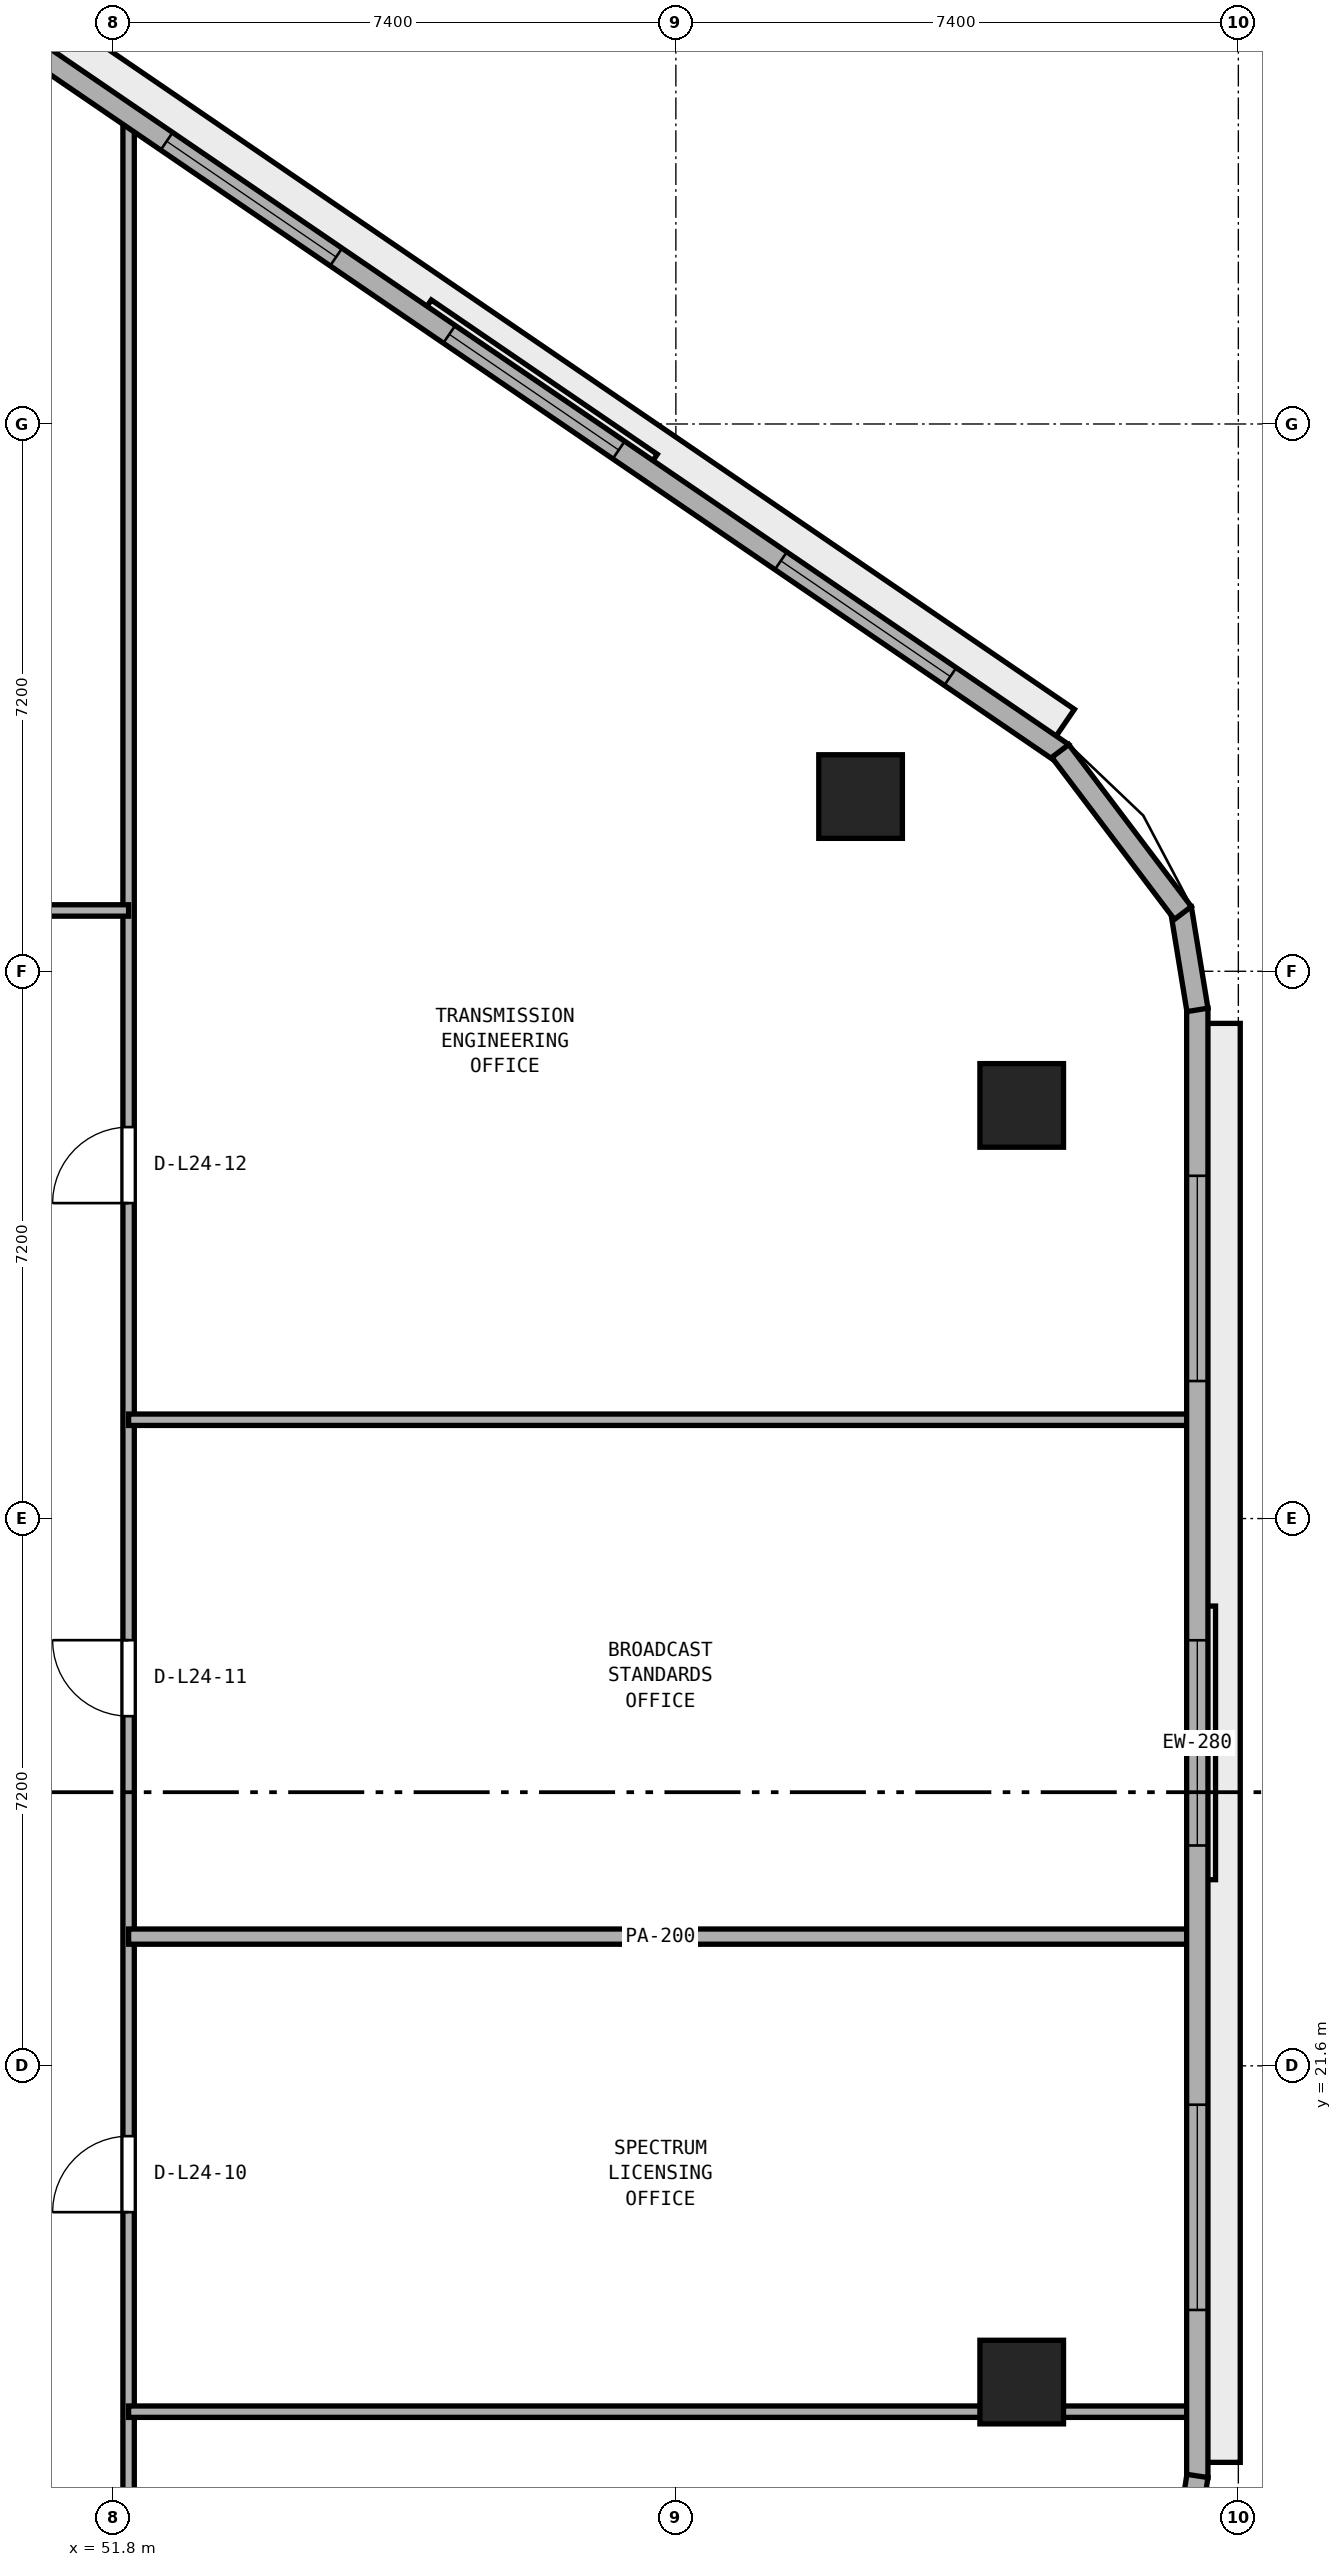
"""IFC4 building model, lengths in metres.
Left out: names, types, materials, properties, quantities, classifications, styles, units other than length and angle.
Written with IfcOpenShell. Run it as: python <this file> out.ifc"""

import sys

from ifc_helpers import new_model, si_unit, direction, frame, frame_2d, origin, origin_2d, place, context, subcontext, project, spatial, rectangle, extrude, element, fill, save


model = new_model("IFC4")
c1 = context("Model", 3, precision=1e-05, world=origin(), true_north=direction((0.0, 1.0)))
c2 = subcontext(c1, "Body", "Model", "MODEL_VIEW")
j1 = project(units=[si_unit("LENGTHUNIT", "METRE"), si_unit("PLANEANGLEUNIT", "RADIAN")], contexts=[c1])
p1 = place(None, origin())
s1 = spatial("IfcSite", under=j1, at=p1, CompositionType="ELEMENT")
p2 = place(p1, origin())
s2 = spatial("IfcBuilding", under=s1, at=p2, CompositionType="ELEMENT")
p3 = place(p2, frame((0.0, 0.0, 97.2)))
s3 = spatial("IfcBuildingStorey", under=s2, at=p3, CompositionType="ELEMENT", Elevation=97.2)
for number, where, z_axis, x_axis in (
    (1, (63.75, 17.44, 0.0), (0.0, 0.0, 1.0), (1.0, 0.0, 0.0)),
    (2, (63.75, 34.235, 0.0), (0.0, 0.0, 1.0), (1.0, 0.0, 0.0)),
    (3, (61.63, 38.299, 0.0), (0.0, 0.0, 1.0), (1.0, 0.0, 0.0)),
):
    element("IfcColumn", number, at=place(p3, frame(where, z_axis=z_axis, x_axis=x_axis)), inside=s3, PredefinedType="COLUMN", context=c2, shape_type="SweptSolid", body=[
        extrude(rectangle(XDim=1.1, YDim=1.1, at=origin_2d()), origin(), (0.0, 0.0, 1.0), 3.8),
    ])
p4 = place(p3, frame((52.0, 13.6, 0.0), z_axis=(0.0, 0.0, 1.0), x_axis=(0.0, 1.0, 0.0)))
e4 = element("IfcWall", 4, at=p4, inside=s3, PredefinedType="PARTITIONING", context=c2, shape_type="SweptSolid", body=[
    extrude(rectangle(XDim=33.691, YDim=0.15, at=frame_2d((16.846, 0.0))), origin(), (0.0, 0.0, 1.0), 3.525),
])
p5 = place(p4, frame((6.075, 0.0, 0.0)))
e5 = element("IfcOpeningElement", 5, at=p5, cuts=e4, PredefinedType="OPENING", context=c2, shape_type="SweptSolid", body=[
    extrude(rectangle(XDim=1.0, YDim=2.12, at=frame_2d((0.5, 1.06))), frame((0.0, 0.085, 0.0), z_axis=(0.0, -1.0, 0.0), x_axis=(1.0, 0.0, 0.0)), (0.0, 0.0, 1.0), 0.17),
])
p6 = place(p4, frame((12.6, 0.0, 0.0)))
e6 = element("IfcOpeningElement", 6, at=p6, cuts=e4, PredefinedType="OPENING", context=c2, shape_type="SweptSolid", body=[
    extrude(rectangle(XDim=1.0, YDim=2.12, at=frame_2d((0.5, 1.06))), frame((0.0, 0.085, 0.0), z_axis=(0.0, -1.0, 0.0), x_axis=(1.0, 0.0, 0.0)), (0.0, 0.0, 1.0), 0.17),
])
p7 = place(p4, frame((19.35, 0.0, 0.0)))
e7 = element("IfcOpeningElement", 7, at=p7, cuts=e4, PredefinedType="OPENING", context=c2, shape_type="SweptSolid", body=[
    extrude(rectangle(XDim=1.0, YDim=2.12, at=frame_2d((0.5, 1.06))), frame((0.0, 0.085, 0.0), z_axis=(0.0, -1.0, 0.0), x_axis=(1.0, 0.0, 0.0)), (0.0, 0.0, 1.0), 0.17),
])
p8 = place(p3, frame((52.0, 17.05, 0.0), z_axis=(0.0, 0.0, 1.0), x_axis=(1.0, 0.0, 0.0)))
e8 = element("IfcWall", 8, at=p8, inside=s3, PredefinedType="PARTITIONING", context=c2, shape_type="SweptSolid", body=[
    extrude(rectangle(XDim=13.995, YDim=0.15, at=frame_2d((6.998, 0.0))), origin(), (0.0, 0.0, 1.0), 3.525),
])
p9 = place(p3, frame((52.0, 23.3, 0.0), z_axis=(0.0, 0.0, 1.0), x_axis=(1.0, 0.0, 0.0)))
e9 = element("IfcWall", 9, at=p9, inside=s3, PredefinedType="PARTITIONING", context=c2, shape_type="SweptSolid", body=[
    extrude(rectangle(XDim=13.995, YDim=0.2, at=frame_2d((6.998, 0.0))), origin(), (0.0, 0.0, 1.0), 3.525),
])
p10 = place(p3, frame((52.0, 30.1, 0.0), z_axis=(0.0, 0.0, 1.0), x_axis=(1.0, 0.0, 0.0)))
e10 = element("IfcWall", 10, at=p10, inside=s3, PredefinedType="PARTITIONING", context=c2, shape_type="SweptSolid", body=[
    extrude(rectangle(XDim=13.995, YDim=0.15, at=frame_2d((6.998, 0.0))), origin(), (0.0, 0.0, 1.0), 3.525),
])
p11 = place(p3, frame((22.0, 36.8, 0.0), z_axis=(0.0, 0.0, 1.0), x_axis=(1.0, 0.0, 0.0)))
e11 = element("IfcWall", 11, at=p11, inside=s3, PredefinedType="PARTITIONING", context=c2, shape_type="SweptSolid", body=[
    extrude(rectangle(XDim=30.0, YDim=0.15, at=frame_2d((15.0, 0.0))), origin(), (0.0, 0.0, 1.0), 3.525),
])
p12 = place(p11, frame((3.67, 0.0, 0.0)))
e12 = element("IfcOpeningElement", 12, at=p12, cuts=e11, PredefinedType="OPENING", context=c2, shape_type="SweptSolid", body=[
    extrude(rectangle(XDim=1.0, YDim=2.12, at=frame_2d((0.5, 1.06))), frame((0.0, 0.085, 0.0), z_axis=(0.0, -1.0, 0.0), x_axis=(1.0, 0.0, 0.0)), (0.0, 0.0, 1.0), 0.17),
])
p13 = place(p11, frame((11.9, 0.0, 0.0)))
e13 = element("IfcOpeningElement", 13, at=p13, cuts=e11, PredefinedType="OPENING", context=c2, shape_type="SweptSolid", body=[
    extrude(rectangle(XDim=1.0, YDim=2.12, at=frame_2d((0.5, 1.06))), frame((0.0, 0.085, 0.0), z_axis=(0.0, -1.0, 0.0), x_axis=(1.0, 0.0, 0.0)), (0.0, 0.0, 1.0), 0.17),
])
p14 = place(p11, frame((20.4, 0.0, 0.0)))
e14 = element("IfcOpeningElement", 14, at=p14, cuts=e11, PredefinedType="OPENING", context=c2, shape_type="SweptSolid", body=[
    extrude(rectangle(XDim=1.0, YDim=2.12, at=frame_2d((0.5, 1.06))), frame((0.0, 0.085, 0.0), z_axis=(0.0, -1.0, 0.0), x_axis=(1.0, 0.0, 0.0)), (0.0, 0.0, 1.0), 0.17),
])
p15 = place(p11, frame((26.93, 0.0, 0.0)))
e15 = element("IfcOpeningElement", 15, at=p15, cuts=e11, PredefinedType="OPENING", context=c2, shape_type="SweptSolid", body=[
    extrude(rectangle(XDim=1.0, YDim=2.12, at=frame_2d((0.5, 1.06))), frame((0.0, 0.085, 0.0), z_axis=(0.0, -1.0, 0.0), x_axis=(1.0, 0.0, 0.0)), (0.0, 0.0, 1.0), 0.17),
])
p16 = place(p3, frame((66.06, 16.183, 0.0), z_axis=(0.0, 0.0, 1.0), x_axis=(0.0, 1.0, 0.0)))
e16 = element("IfcWall", 16, at=p16, inside=s3, PredefinedType="STANDARD", context=c2, shape_type="SweptSolid", body=[
    extrude(rectangle(XDim=19.331, YDim=0.28, at=frame_2d((9.666, 0.0))), origin(), (0.0, 0.0, 1.0), 3.525),
])
p17 = place(p16, frame((2.205, 0.0, 0.9)))
e17 = element("IfcOpeningElement", 17, at=p17, cuts=e16, PredefinedType="OPENING", context=c2, shape_type="SweptSolid", body=[
    extrude(rectangle(XDim=2.7, YDim=1.75, at=frame_2d((1.35, 0.875))), frame((0.0, 0.15, 0.0), z_axis=(0.0, -1.0, 0.0), x_axis=(1.0, 0.0, 0.0)), (0.0, 0.0, 1.0), 0.3),
])
p18 = place(p16, frame((8.315, 0.0, 0.9)))
e18 = element("IfcOpeningElement", 18, at=p18, cuts=e16, PredefinedType="OPENING", context=c2, shape_type="SweptSolid", body=[
    extrude(rectangle(XDim=2.7, YDim=1.75, at=frame_2d((1.35, 0.875))), frame((0.0, 0.15, 0.0), z_axis=(0.0, -1.0, 0.0), x_axis=(1.0, 0.0, 0.0)), (0.0, 0.0, 1.0), 0.3),
])
p19 = place(p16, frame((14.426, 0.0, 0.9)))
e19 = element("IfcOpeningElement", 19, at=p19, cuts=e16, PredefinedType="OPENING", context=c2, shape_type="SweptSolid", body=[
    extrude(rectangle(XDim=2.7, YDim=1.75, at=frame_2d((1.35, 0.875))), frame((0.0, 0.15, 0.0), z_axis=(0.0, -1.0, 0.0), x_axis=(1.0, 0.0, 0.0)), (0.0, 0.0, 1.0), 0.3),
])
p20 = place(p3, frame((64.29, 38.867, 0.0), z_axis=(0.0, 0.0, 1.0), x_axis=(-0.825755550159, 0.564028165416, 0.0)))
e20 = element("IfcWall", 20, at=p20, inside=s3, PredefinedType="STANDARD", context=c2, shape_type="SweptSolid", body=[
    extrude(rectangle(XDim=16.848, YDim=0.28, at=frame_2d((8.424, 0.0))), origin(), (0.0, 0.0, 1.0), 3.525),
])
p21 = place(p20, frame((1.792, 0.0, 0.9)))
e21 = element("IfcOpeningElement", 21, at=p21, cuts=e20, PredefinedType="OPENING", context=c2, shape_type="SweptSolid", body=[
    extrude(rectangle(XDim=2.7, YDim=1.75, at=frame_2d((1.35, 0.875))), frame((0.0, 0.15, 0.0), z_axis=(0.0, -1.0, 0.0), x_axis=(1.0, 0.0, 0.0)), (0.0, 0.0, 1.0), 0.3),
])
p22 = place(p20, frame((7.074, 0.0, 0.9)))
e22 = element("IfcOpeningElement", 22, at=p22, cuts=e20, PredefinedType="OPENING", context=c2, shape_type="SweptSolid", body=[
    extrude(rectangle(XDim=2.7, YDim=1.75, at=frame_2d((1.35, 0.875))), frame((0.0, 0.15, 0.0), z_axis=(0.0, -1.0, 0.0), x_axis=(1.0, 0.0, 0.0)), (0.0, 0.0, 1.0), 0.3),
])
p23 = place(p20, frame((11.577, 0.0, 0.9)))
e23 = element("IfcOpeningElement", 23, at=p23, cuts=e20, PredefinedType="OPENING", context=c2, shape_type="SweptSolid", body=[
    extrude(rectangle(XDim=2.7, YDim=1.75, at=frame_2d((1.35, 0.875))), frame((0.0, 0.15, 0.0), z_axis=(0.0, -1.0, 0.0), x_axis=(1.0, 0.0, 0.0)), (0.0, 0.0, 1.0), 0.3),
])
p24 = place(p3, frame((65.867, 14.943, 0.0), z_axis=(0.0, 0.0, 1.0), x_axis=(0.152014078361, 0.988378328364, 0.0)))
e24 = element("IfcWall", 24, at=p24, inside=s3, PredefinedType="STANDARD", context=c2, shape_type="SweptSolid", body=[
    extrude(rectangle(XDim=1.277, YDim=0.28, at=frame_2d((0.638, 0.0))), origin(), (0.0, 0.0, 1.0), 3.525),
])
p25 = place(p3, frame((66.062, 35.492, 0.0), z_axis=(0.0, 0.0, 1.0), x_axis=(-0.161182073582, 0.986924687682, 0.0)))
e25 = element("IfcWall", 25, at=p25, inside=s3, PredefinedType="STANDARD", context=c2, shape_type="SweptSolid", body=[
    extrude(rectangle(XDim=1.354, YDim=0.28, at=frame_2d((0.677, 0.0))), origin(), (0.0, 0.0, 1.0), 3.525),
])
p26 = place(p3, frame((65.87, 36.767, 0.0), z_axis=(0.0, 0.0, 1.0), x_axis=(-0.603370463754, 0.797461023166, 0.0)))
e26 = element("IfcWall", 26, at=p26, inside=s3, PredefinedType="STANDARD", context=c2, shape_type="SweptSolid", body=[
    extrude(rectangle(XDim=2.673, YDim=0.28, at=frame_2d((1.336, 0.0))), origin(), (0.0, 0.0, 1.0), 3.525),
])
p27 = place(p5, origin())
e27 = element("IfcDoor", 27, at=p27, inside=s3, OperationType="SINGLE_SWING_LEFT", PredefinedType="DOOR", context=c2, shape_type="SweptSolid", body=[
    extrude(rectangle(XDim=1.0, YDim=2.12, at=frame_2d((0.5, 1.06))), frame((0.0, 0.025, 0.0), z_axis=(0.0, -1.0, 0.0), x_axis=(1.0, 0.0, 0.0)), (0.0, 0.0, 1.0), 0.05),
])
fill(e5, e27)
p28 = place(p6, origin())
e28 = element("IfcDoor", 28, at=p28, inside=s3, OperationType="SINGLE_SWING_RIGHT", PredefinedType="DOOR", context=c2, shape_type="SweptSolid", body=[
    extrude(rectangle(XDim=1.0, YDim=2.12, at=frame_2d((0.5, 1.06))), frame((0.0, 0.025, 0.0), z_axis=(0.0, -1.0, 0.0), x_axis=(1.0, 0.0, 0.0)), (0.0, 0.0, 1.0), 0.05),
])
fill(e6, e28)
p29 = place(p7, origin())
e29 = element("IfcDoor", 29, at=p29, inside=s3, OperationType="SINGLE_SWING_LEFT", PredefinedType="DOOR", context=c2, shape_type="SweptSolid", body=[
    extrude(rectangle(XDim=1.0, YDim=2.12, at=frame_2d((0.5, 1.06))), frame((0.0, 0.025, 0.0), z_axis=(0.0, -1.0, 0.0), x_axis=(1.0, 0.0, 0.0)), (0.0, 0.0, 1.0), 0.05),
])
fill(e7, e29)
p30 = place(p17, origin())
e30 = element("IfcWindow", 30, at=p30, inside=s3, PartitioningType="SINGLE_PANEL", PredefinedType="WINDOW", context=c2, shape_type="SweptSolid", body=[
    extrude(rectangle(XDim=2.7, YDim=1.75, at=frame_2d((1.35, 0.875))), frame((0.0, 0.03, 0.0), z_axis=(0.0, -1.0, 0.0), x_axis=(1.0, 0.0, 0.0)), (0.0, 0.0, 1.0), 0.06),
])
fill(e17, e30)
p31 = place(p18, origin())
e31 = element("IfcWindow", 31, at=p31, inside=s3, PartitioningType="SINGLE_PANEL", PredefinedType="WINDOW", context=c2, shape_type="SweptSolid", body=[
    extrude(rectangle(XDim=2.7, YDim=1.75, at=frame_2d((1.35, 0.875))), frame((0.0, 0.03, 0.0), z_axis=(0.0, -1.0, 0.0), x_axis=(1.0, 0.0, 0.0)), (0.0, 0.0, 1.0), 0.06),
])
fill(e18, e31)
p32 = place(p19, origin())
e32 = element("IfcWindow", 32, at=p32, inside=s3, PartitioningType="SINGLE_PANEL", PredefinedType="WINDOW", context=c2, shape_type="SweptSolid", body=[
    extrude(rectangle(XDim=2.7, YDim=1.75, at=frame_2d((1.35, 0.875))), frame((0.0, 0.03, 0.0), z_axis=(0.0, -1.0, 0.0), x_axis=(1.0, 0.0, 0.0)), (0.0, 0.0, 1.0), 0.06),
])
fill(e19, e32)
p33 = place(p21, origin())
e33 = element("IfcWindow", 33, at=p33, inside=s3, PartitioningType="SINGLE_PANEL", PredefinedType="WINDOW", context=c2, shape_type="SweptSolid", body=[
    extrude(rectangle(XDim=2.7, YDim=1.75, at=frame_2d((1.35, 0.875))), frame((0.0, 0.03, 0.0), z_axis=(0.0, -1.0, 0.0), x_axis=(1.0, 0.0, 0.0)), (0.0, 0.0, 1.0), 0.06),
])
fill(e21, e33)
p34 = place(p22, origin())
e34 = element("IfcWindow", 34, at=p34, inside=s3, PartitioningType="SINGLE_PANEL", PredefinedType="WINDOW", context=c2, shape_type="SweptSolid", body=[
    extrude(rectangle(XDim=2.7, YDim=1.75, at=frame_2d((1.35, 0.875))), frame((0.0, 0.03, 0.0), z_axis=(0.0, -1.0, 0.0), x_axis=(1.0, 0.0, 0.0)), (0.0, 0.0, 1.0), 0.06),
])
fill(e22, e34)
p35 = place(p23, origin())
e35 = element("IfcWindow", 35, at=p35, inside=s3, PartitioningType="SINGLE_PANEL", PredefinedType="WINDOW", context=c2, shape_type="SweptSolid", body=[
    extrude(rectangle(XDim=2.7, YDim=1.75, at=frame_2d((1.35, 0.875))), frame((0.0, 0.03, 0.0), z_axis=(0.0, -1.0, 0.0), x_axis=(1.0, 0.0, 0.0)), (0.0, 0.0, 1.0), 0.06),
])
fill(e23, e35)
save(model, sys.argv[1])
